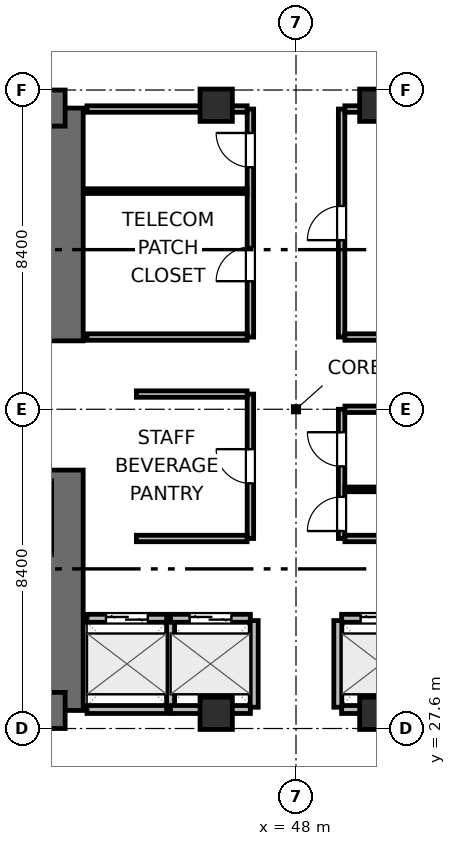
"""IFC4 building model, lengths in metres.
Left out: names, types, materials, properties, quantities, classifications, styles, units other than length and angle.
Written with IfcOpenShell. Run it as: python <this file> out.ifc"""

import sys

from ifc_helpers import new_model, si_unit, direction, frame, frame_2d, origin, origin_2d, place, context, subcontext, project, spatial, rectangle, extrude, element, fill, save


model = new_model("IFC4")
c1 = context("Model", 3, precision=1e-05, world=origin(), true_north=direction((0.0, 1.0)))
c2 = subcontext(c1, "Body", "Model", "MODEL_VIEW")
j1 = project(units=[si_unit("LENGTHUNIT", "METRE"), si_unit("PLANEANGLEUNIT", "RADIAN")], contexts=[c1])
p1 = place(None, origin())
s1 = spatial("IfcSite", under=j1, at=p1, CompositionType="ELEMENT")
p2 = place(p1, origin())
s2 = spatial("IfcBuilding", under=s1, at=p2, CompositionType="ELEMENT")
p3 = place(p2, frame((0.0, 0.0, 21.6)))
s3 = spatial("IfcBuildingStorey", under=s2, at=p3, CompositionType="ELEMENT", Elevation=21.6)
p4 = place(p3, frame((41.925, 28.075, 0.0), z_axis=(0.0, 0.0, 1.0), x_axis=(0.0, 1.0, 0.0)))
e1 = element("IfcWall", 1, at=p4, inside=s3, PredefinedType="SHEAR", context=c2, shape_type="SweptSolid", body=[
    extrude(rectangle(XDim=6.325, YDim=0.95, at=frame_2d((3.163, 0.0))), origin(), (0.0, 0.0, 1.0), 3.9),
])
p5 = place(p3, frame((41.925, 37.8, 0.0), z_axis=(0.0, 0.0, 1.0), x_axis=(0.0, 1.0, 0.0)))
e2 = element("IfcWall", 2, at=p5, inside=s3, PredefinedType="SHEAR", context=c2, shape_type="SweptSolid", body=[
    extrude(rectangle(XDim=6.125, YDim=0.95, at=frame_2d((3.062, 0.0))), origin(), (0.0, 0.0, 1.0), 3.9),
])
p6 = place(p3, frame((32.875, 28.075, 0.0), z_axis=(0.0, 0.0, 1.0), x_axis=(1.0, 0.0, 0.0)))
e3 = element("IfcWall", 3, at=p6, inside=s3, PredefinedType="SHEAR", context=c2, shape_type="SweptSolid", body=[
    extrude(rectangle(XDim=9.05, YDim=0.95, at=frame_2d((4.525, 0.0))), origin(), (0.0, 0.0, 1.0), 3.9),
])
p7 = place(p6, frame((4.975, 0.0, 0.0)))
e4 = element("IfcOpeningElement", 4, at=p7, cuts=e3, PredefinedType="OPENING", context=c2, shape_type="SweptSolid", body=[
    extrude(rectangle(XDim=1.05, YDim=2.04, at=frame_2d((0.525, 1.02))), frame((0.0, 0.485, 0.0), z_axis=(0.0, -1.0, 0.0), x_axis=(1.0, 0.0, 0.0)), (0.0, 0.0, 1.0), 0.97),
])
p8 = place(p3, frame((32.875, 43.925, 0.0), z_axis=(0.0, 0.0, 1.0), x_axis=(1.0, 0.0, 0.0)))
e5 = element("IfcWall", 5, at=p8, inside=s3, PredefinedType="SHEAR", context=c2, shape_type="SweptSolid", body=[
    extrude(rectangle(XDim=9.05, YDim=0.95, at=frame_2d((4.525, 0.0))), origin(), (0.0, 0.0, 1.0), 3.9),
])
p9 = place(p8, frame((0.975, 0.0, 0.0)))
e6 = element("IfcOpeningElement", 6, at=p9, cuts=e5, PredefinedType="OPENING", context=c2, shape_type="SweptSolid", body=[
    extrude(rectangle(XDim=0.95, YDim=2.04, at=frame_2d((0.475, 1.02))), frame((0.0, 0.485, 0.0), z_axis=(0.0, -1.0, 0.0), x_axis=(1.0, 0.0, 0.0)), (0.0, 0.0, 1.0), 0.97),
])
p10 = place(p8, frame((4.225, 0.0, 0.0)))
e7 = element("IfcOpeningElement", 7, at=p10, cuts=e5, PredefinedType="OPENING", context=c2, shape_type="SweptSolid", body=[
    extrude(rectangle(XDim=0.9, YDim=2.02, at=frame_2d((0.45, 1.01))), frame((0.0, 0.485, 0.0), z_axis=(0.0, -1.0, 0.0), x_axis=(1.0, 0.0, 0.0)), (0.0, 0.0, 1.0), 0.97),
])
p11 = place(p8, frame((7.125, 0.0, 0.0)))
e8 = element("IfcOpeningElement", 8, at=p11, cuts=e5, PredefinedType="OPENING", context=c2, shape_type="SweptSolid", body=[
    extrude(rectangle(XDim=0.9, YDim=2.02, at=frame_2d((0.45, 1.01))), frame((0.0, 0.485, 0.0), z_axis=(0.0, -1.0, 0.0), x_axis=(1.0, 0.0, 0.0)), (0.0, 0.0, 1.0), 0.97),
])
for number, where, z_axis, x_axis in (
    (9, (45.9, 28.0, 0.0), (0.0, 0.0, 1.0), (1.0, 0.0, 0.0)),
    (10, (50.1, 28.0, 0.0), (0.0, 0.0, 1.0), (1.0, 0.0, 0.0)),
    (11, (45.9, 44.0, 0.0), (0.0, 0.0, 1.0), (1.0, 0.0, 0.0)),
    (12, (50.1, 44.0, 0.0), (0.0, 0.0, 1.0), (1.0, 0.0, 0.0)),
):
    element("IfcColumn", number, at=place(p3, frame(where, z_axis=z_axis, x_axis=x_axis)), inside=s3, PredefinedType="COLUMN", context=c2, shape_type="SweptSolid", body=[
        extrude(rectangle(XDim=0.85, YDim=0.85, at=origin_2d()), origin(), (0.0, 0.0, 1.0), 3.9),
    ])
p12 = place(p3, frame((42.5, 30.5, 0.0), z_axis=(0.0, 0.0, 1.0), x_axis=(1.0, 0.0, 0.0)))
e13 = element("IfcWall", 13, at=p12, inside=s3, PredefinedType="PARTITIONING", context=c2, shape_type="SweptSolid", body=[
    extrude(rectangle(XDim=2.1, YDim=0.21, at=frame_2d((1.05, 0.0))), origin(), (0.0, 0.0, 1.0), 3.64),
])
p13 = place(p12, frame((0.5, 0.0, 0.0)))
e14 = element("IfcOpeningElement", 14, at=p13, cuts=e13, PredefinedType="OPENING", context=c2, shape_type="SweptSolid", body=[
    extrude(rectangle(XDim=1.1, YDim=2.04, at=frame_2d((0.55, 1.02))), frame((0.0, 0.115, 0.0), z_axis=(0.0, -1.0, 0.0), x_axis=(1.0, 0.0, 0.0)), (0.0, 0.0, 1.0), 0.23),
])
p14 = place(p3, frame((42.5, 28.1, 0.0), z_axis=(0.0, 0.0, 1.0), x_axis=(1.0, 0.0, 0.0)))
e15 = element("IfcWall", 15, at=p14, inside=s3, PredefinedType="PARTITIONING", context=c2, shape_type="SweptSolid", body=[
    extrude(rectangle(XDim=2.1, YDim=0.21, at=frame_2d((1.05, 0.0))), origin(), (0.0, 0.0, 1.0), 2.525),
])
p15 = place(p3, frame((44.7, 28.16, 0.0), z_axis=(0.0, 0.0, 1.0), x_axis=(0.0, 1.0, 0.0)))
e16 = element("IfcWall", 16, at=p15, inside=s3, PredefinedType="PARTITIONING", context=c2, shape_type="SweptSolid", body=[
    extrude(rectangle(XDim=2.28, YDim=0.21, at=frame_2d((1.14, 0.0))), origin(), (0.0, 0.0, 1.0), 3.64),
])
p16 = place(p3, frame((44.7, 30.5, 0.0), z_axis=(0.0, 0.0, 1.0), x_axis=(1.0, 0.0, 0.0)))
e17 = element("IfcWall", 17, at=p16, inside=s3, PredefinedType="PARTITIONING", context=c2, shape_type="SweptSolid", body=[
    extrude(rectangle(XDim=2.1, YDim=0.21, at=frame_2d((1.05, 0.0))), origin(), (0.0, 0.0, 1.0), 3.64),
])
p17 = place(p16, frame((0.5, 0.0, 0.0)))
e18 = element("IfcOpeningElement", 18, at=p17, cuts=e17, PredefinedType="OPENING", context=c2, shape_type="SweptSolid", body=[
    extrude(rectangle(XDim=1.1, YDim=2.04, at=frame_2d((0.55, 1.02))), frame((0.0, 0.115, 0.0), z_axis=(0.0, -1.0, 0.0), x_axis=(1.0, 0.0, 0.0)), (0.0, 0.0, 1.0), 0.23),
])
p18 = place(p3, frame((44.7, 28.1, 0.0), z_axis=(0.0, 0.0, 1.0), x_axis=(1.0, 0.0, 0.0)))
e19 = element("IfcWall", 19, at=p18, inside=s3, PredefinedType="PARTITIONING", context=c2, shape_type="SweptSolid", body=[
    extrude(rectangle(XDim=2.1, YDim=0.21, at=frame_2d((1.05, 0.0))), origin(), (0.0, 0.0, 1.0), 2.525),
])
p19 = place(p3, frame((46.9, 28.16, 0.0), z_axis=(0.0, 0.0, 1.0), x_axis=(0.0, 1.0, 0.0)))
e20 = element("IfcWall", 20, at=p19, inside=s3, PredefinedType="PARTITIONING", context=c2, shape_type="SweptSolid", body=[
    extrude(rectangle(XDim=2.28, YDim=0.21, at=frame_2d((1.14, 0.0))), origin(), (0.0, 0.0, 1.0), 3.64),
])
p20 = place(p3, frame((49.2, 30.5, 0.0), z_axis=(0.0, 0.0, 1.0), x_axis=(1.0, 0.0, 0.0)))
e21 = element("IfcWall", 21, at=p20, inside=s3, PredefinedType="PARTITIONING", context=c2, shape_type="SweptSolid", body=[
    extrude(rectangle(XDim=2.1, YDim=0.21, at=frame_2d((1.05, 0.0))), origin(), (0.0, 0.0, 1.0), 3.64),
])
p21 = place(p20, frame((0.5, 0.0, 0.0)))
e22 = element("IfcOpeningElement", 22, at=p21, cuts=e21, PredefinedType="OPENING", context=c2, shape_type="SweptSolid", body=[
    extrude(rectangle(XDim=1.1, YDim=2.04, at=frame_2d((0.55, 1.02))), frame((0.0, 0.115, 0.0), z_axis=(0.0, -1.0, 0.0), x_axis=(1.0, 0.0, 0.0)), (0.0, 0.0, 1.0), 0.23),
])
p22 = place(p3, frame((49.2, 28.1, 0.0), z_axis=(0.0, 0.0, 1.0), x_axis=(1.0, 0.0, 0.0)))
e23 = element("IfcWall", 23, at=p22, inside=s3, PredefinedType="PARTITIONING", context=c2, shape_type="SweptSolid", body=[
    extrude(rectangle(XDim=2.1, YDim=0.21, at=frame_2d((1.05, 0.0))), origin(), (0.0, 0.0, 1.0), 2.525),
])
p23 = place(p3, frame((49.1, 28.16, 0.0), z_axis=(0.0, 0.0, 1.0), x_axis=(0.0, 1.0, 0.0)))
e24 = element("IfcWall", 24, at=p23, inside=s3, PredefinedType="PARTITIONING", context=c2, shape_type="SweptSolid", body=[
    extrude(rectangle(XDim=2.28, YDim=0.21, at=frame_2d((1.14, 0.0))), origin(), (0.0, 0.0, 1.0), 3.64),
])
p24 = place(p3, frame((46.8, 32.6, 0.0), z_axis=(0.0, 0.0, 1.0), x_axis=(0.0, 1.0, 0.0)))
e25 = element("IfcWall", 25, at=p24, inside=s3, PredefinedType="PARTITIONING", context=c2, shape_type="SweptSolid", body=[
    extrude(rectangle(XDim=3.8, YDim=0.17, at=frame_2d((1.9, 0.0))), origin(), (0.0, 0.0, 1.0), 3.64),
])
p25 = place(p24, frame((1.45, 0.0, 0.0)))
e26 = element("IfcOpeningElement", 26, at=p25, cuts=e25, PredefinedType="OPENING", context=c2, shape_type="SweptSolid", body=[
    extrude(rectangle(XDim=0.9, YDim=2.02, at=frame_2d((0.45, 1.01))), frame((0.0, 0.095, 0.0), z_axis=(0.0, -1.0, 0.0), x_axis=(1.0, 0.0, 0.0)), (0.0, 0.0, 1.0), 0.19),
])
for number, where, z_axis, x_axis in (
    (27, (43.8, 32.6, 0.0), (0.0, 0.0, 1.0), (1.0, 0.0, 0.0)),
    (28, (43.8, 36.4, 0.0), (0.0, 0.0, 1.0), (1.0, 0.0, 0.0)),
):
    element("IfcWall", number, at=place(p3, frame(where, z_axis=z_axis, x_axis=x_axis)), inside=s3, PredefinedType="PARTITIONING", context=c2, shape_type="SweptSolid", body=[
        extrude(rectangle(XDim=2.913, YDim=0.17, at=frame_2d((1.457, 0.0))), origin(), (0.0, 0.0, 1.0), 3.64),
    ])
p26 = place(p3, frame((49.2, 32.6, 0.0), z_axis=(0.0, 0.0, 1.0), x_axis=(0.0, 1.0, 0.0)))
e29 = element("IfcWall", 29, at=p26, inside=s3, PredefinedType="PARTITIONING", context=c2, shape_type="SweptSolid", body=[
    extrude(rectangle(XDim=3.4, YDim=0.17, at=frame_2d((1.7, 0.0))), origin(), (0.0, 0.0, 1.0), 3.64),
])
p27 = place(p26, frame((0.196, 0.0, 0.0)))
e30 = element("IfcOpeningElement", 30, at=p27, cuts=e29, PredefinedType="OPENING", context=c2, shape_type="SweptSolid", body=[
    extrude(rectangle(XDim=0.9, YDim=2.02, at=frame_2d((0.45, 1.01))), frame((0.0, 0.095, 0.0), z_axis=(0.0, -1.0, 0.0), x_axis=(1.0, 0.0, 0.0)), (0.0, 0.0, 1.0), 0.19),
])
p28 = place(p26, frame((1.896, 0.0, 0.0)))
e31 = element("IfcOpeningElement", 31, at=p28, cuts=e29, PredefinedType="OPENING", context=c2, shape_type="SweptSolid", body=[
    extrude(rectangle(XDim=0.9, YDim=2.02, at=frame_2d((0.45, 1.01))), frame((0.0, 0.095, 0.0), z_axis=(0.0, -1.0, 0.0), x_axis=(1.0, 0.0, 0.0)), (0.0, 0.0, 1.0), 0.19),
])
for number, where, z_axis, x_axis in (
    (32, (49.287, 32.6, 0.0), (0.0, 0.0, 1.0), (1.0, 0.0, 0.0)),
    (33, (49.287, 36.0, 0.0), (0.0, 0.0, 1.0), (1.0, 0.0, 0.0)),
):
    element("IfcWall", number, at=place(p3, frame(where, z_axis=z_axis, x_axis=x_axis)), inside=s3, PredefinedType="PARTITIONING", context=c2, shape_type="SweptSolid", body=[
        extrude(rectangle(XDim=2.913, YDim=0.17, at=frame_2d((1.457, 0.0))), origin(), (0.0, 0.0, 1.0), 3.64),
    ])
p29 = place(p3, frame((49.287, 33.892, 0.0), z_axis=(0.0, 0.0, 1.0), x_axis=(1.0, 0.0, 0.0)))
e34 = element("IfcWall", 34, at=p29, inside=s3, PredefinedType="PARTITIONING", context=c2, shape_type="SweptSolid", body=[
    extrude(rectangle(XDim=2.913, YDim=0.125, at=frame_2d((1.457, 0.0))), origin(), (0.0, 0.0, 1.0), 3.64),
])
p30 = place(p3, frame((46.8, 37.9, 0.0), z_axis=(0.0, 0.0, 1.0), x_axis=(0.0, 1.0, 0.0)))
e35 = element("IfcWall", 35, at=p30, inside=s3, PredefinedType="PARTITIONING", context=c2, shape_type="SweptSolid", body=[
    extrude(rectangle(XDim=6.0, YDim=0.17, at=frame_2d((3.0, 0.0))), origin(), (0.0, 0.0, 1.0), 3.64),
])
p31 = place(p30, frame((1.47, 0.0, 0.0)))
e36 = element("IfcOpeningElement", 36, at=p31, cuts=e35, PredefinedType="OPENING", context=c2, shape_type="SweptSolid", body=[
    extrude(rectangle(XDim=0.9, YDim=2.02, at=frame_2d((0.45, 1.01))), frame((0.0, 0.095, 0.0), z_axis=(0.0, -1.0, 0.0), x_axis=(1.0, 0.0, 0.0)), (0.0, 0.0, 1.0), 0.19),
])
p32 = place(p30, frame((4.47, 0.0, 0.0)))
e37 = element("IfcOpeningElement", 37, at=p32, cuts=e35, PredefinedType="OPENING", context=c2, shape_type="SweptSolid", body=[
    extrude(rectangle(XDim=0.9, YDim=2.02, at=frame_2d((0.45, 1.01))), frame((0.0, 0.095, 0.0), z_axis=(0.0, -1.0, 0.0), x_axis=(1.0, 0.0, 0.0)), (0.0, 0.0, 1.0), 0.19),
])
p33 = place(p3, frame((42.5, 37.9, 0.0), z_axis=(0.0, 0.0, 1.0), x_axis=(1.0, 0.0, 0.0)))
e38 = element("IfcWall", 38, at=p33, inside=s3, PredefinedType="PARTITIONING", context=c2, shape_type="SweptSolid", body=[
    extrude(rectangle(XDim=4.213, YDim=0.17, at=frame_2d((2.106, 0.0))), origin(), (0.0, 0.0, 1.0), 3.64),
])
p34 = place(p3, frame((42.5, 43.9, 0.0), z_axis=(0.0, 0.0, 1.0), x_axis=(1.0, 0.0, 0.0)))
e39 = element("IfcWall", 39, at=p34, inside=s3, PredefinedType="PARTITIONING", context=c2, shape_type="SweptSolid", body=[
    extrude(rectangle(XDim=4.213, YDim=0.17, at=frame_2d((2.106, 0.0))), origin(), (0.0, 0.0, 1.0), 2.525),
])
p35 = place(p3, frame((42.5, 41.74, 0.0), z_axis=(0.0, 0.0, 1.0), x_axis=(1.0, 0.0, 0.0)))
e40 = element("IfcWall", 40, at=p35, inside=s3, PredefinedType="PARTITIONING", context=c2, shape_type="SweptSolid", body=[
    extrude(rectangle(XDim=4.213, YDim=0.125, at=frame_2d((2.106, 0.0))), origin(), (0.0, 0.0, 1.0), 3.64),
])
p36 = place(p3, frame((49.2, 37.9, 0.0), z_axis=(0.0, 0.0, 1.0), x_axis=(0.0, 1.0, 0.0)))
e41 = element("IfcWall", 41, at=p36, inside=s3, PredefinedType="PARTITIONING", context=c2, shape_type="SweptSolid", body=[
    extrude(rectangle(XDim=6.0, YDim=0.17, at=frame_2d((3.0, 0.0))), origin(), (0.0, 0.0, 1.0), 3.64),
])
p37 = place(p36, frame((2.55, 0.0, 0.0)))
e42 = element("IfcOpeningElement", 42, at=p37, cuts=e41, PredefinedType="OPENING", context=c2, shape_type="SweptSolid", body=[
    extrude(rectangle(XDim=0.9, YDim=2.02, at=frame_2d((0.45, 1.01))), frame((0.0, 0.095, 0.0), z_axis=(0.0, -1.0, 0.0), x_axis=(1.0, 0.0, 0.0)), (0.0, 0.0, 1.0), 0.19),
])
p38 = place(p3, frame((49.287, 37.9, 0.0), z_axis=(0.0, 0.0, 1.0), x_axis=(1.0, 0.0, 0.0)))
e43 = element("IfcWall", 43, at=p38, inside=s3, PredefinedType="PARTITIONING", context=c2, shape_type="SweptSolid", body=[
    extrude(rectangle(XDim=4.113, YDim=0.17, at=frame_2d((2.056, 0.0))), origin(), (0.0, 0.0, 1.0), 3.64),
])
p39 = place(p3, frame((49.287, 43.9, 0.0), z_axis=(0.0, 0.0, 1.0), x_axis=(1.0, 0.0, 0.0)))
e44 = element("IfcWall", 44, at=p39, inside=s3, PredefinedType="PARTITIONING", context=c2, shape_type="SweptSolid", body=[
    extrude(rectangle(XDim=4.113, YDim=0.17, at=frame_2d((2.056, 0.0))), origin(), (0.0, 0.0, 1.0), 2.525),
])
p40 = place(p13, origin())
e45 = element("IfcDoor", 45, at=p40, inside=s3, OperationType="DOUBLE_DOOR_SLIDING", PredefinedType="DOOR", context=c2, shape_type="SweptSolid", body=[
    extrude(rectangle(XDim=1.1, YDim=2.04, at=frame_2d((0.55, 1.02))), frame((0.0, 0.025, 0.0), z_axis=(0.0, -1.0, 0.0), x_axis=(1.0, 0.0, 0.0)), (0.0, 0.0, 1.0), 0.05),
])
fill(e14, e45)
p41 = place(p17, origin())
e46 = element("IfcDoor", 46, at=p41, inside=s3, OperationType="DOUBLE_DOOR_SLIDING", PredefinedType="DOOR", context=c2, shape_type="SweptSolid", body=[
    extrude(rectangle(XDim=1.1, YDim=2.04, at=frame_2d((0.55, 1.02))), frame((0.0, 0.025, 0.0), z_axis=(0.0, -1.0, 0.0), x_axis=(1.0, 0.0, 0.0)), (0.0, 0.0, 1.0), 0.05),
])
fill(e18, e46)
p42 = place(p21, origin())
e47 = element("IfcDoor", 47, at=p42, inside=s3, OperationType="DOUBLE_DOOR_SLIDING", PredefinedType="DOOR", context=c2, shape_type="SweptSolid", body=[
    extrude(rectangle(XDim=1.1, YDim=2.04, at=frame_2d((0.55, 1.02))), frame((0.0, 0.025, 0.0), z_axis=(0.0, -1.0, 0.0), x_axis=(1.0, 0.0, 0.0)), (0.0, 0.0, 1.0), 0.05),
])
fill(e22, e47)
p43 = place(p25, origin())
e48 = element("IfcDoor", 48, at=p43, inside=s3, OperationType="SINGLE_SWING_RIGHT", PredefinedType="DOOR", context=c2, shape_type="SweptSolid", body=[
    extrude(rectangle(XDim=0.9, YDim=2.02, at=frame_2d((0.45, 1.01))), frame((0.0, 0.025, 0.0), z_axis=(0.0, -1.0, 0.0), x_axis=(1.0, 0.0, 0.0)), (0.0, 0.0, 1.0), 0.05),
])
fill(e26, e48)
p44 = place(p27, origin())
e49 = element("IfcDoor", 49, at=p44, inside=s3, OperationType="SINGLE_SWING_LEFT", PredefinedType="DOOR", context=c2, shape_type="SweptSolid", body=[
    extrude(rectangle(XDim=0.9, YDim=2.02, at=frame_2d((0.45, 1.01))), frame((0.0, 0.025, 0.0), z_axis=(0.0, -1.0, 0.0), x_axis=(1.0, 0.0, 0.0)), (0.0, 0.0, 1.0), 0.05),
])
fill(e30, e49)
p45 = place(p28, origin())
e50 = element("IfcDoor", 50, at=p45, inside=s3, OperationType="SINGLE_SWING_RIGHT", PredefinedType="DOOR", context=c2, shape_type="SweptSolid", body=[
    extrude(rectangle(XDim=0.9, YDim=2.02, at=frame_2d((0.45, 1.01))), frame((0.0, 0.025, 0.0), z_axis=(0.0, -1.0, 0.0), x_axis=(1.0, 0.0, 0.0)), (0.0, 0.0, 1.0), 0.05),
])
fill(e31, e50)
p46 = place(p31, origin())
e51 = element("IfcDoor", 51, at=p46, inside=s3, OperationType="SINGLE_SWING_LEFT", PredefinedType="DOOR", context=c2, shape_type="SweptSolid", body=[
    extrude(rectangle(XDim=0.9, YDim=2.02, at=frame_2d((0.45, 1.01))), frame((0.0, 0.025, 0.0), z_axis=(0.0, -1.0, 0.0), x_axis=(1.0, 0.0, 0.0)), (0.0, 0.0, 1.0), 0.05),
])
fill(e36, e51)
p47 = place(p32, origin())
e52 = element("IfcDoor", 52, at=p47, inside=s3, OperationType="SINGLE_SWING_RIGHT", PredefinedType="DOOR", context=c2, shape_type="SweptSolid", body=[
    extrude(rectangle(XDim=0.9, YDim=2.02, at=frame_2d((0.45, 1.01))), frame((0.0, 0.025, 0.0), z_axis=(0.0, -1.0, 0.0), x_axis=(1.0, 0.0, 0.0)), (0.0, 0.0, 1.0), 0.05),
])
fill(e37, e52)
p48 = place(p37, origin())
e53 = element("IfcDoor", 53, at=p48, inside=s3, OperationType="SINGLE_SWING_LEFT", PredefinedType="DOOR", context=c2, shape_type="SweptSolid", body=[
    extrude(rectangle(XDim=0.9, YDim=2.02, at=frame_2d((0.45, 1.01))), frame((0.0, 0.025, 0.0), z_axis=(0.0, -1.0, 0.0), x_axis=(1.0, 0.0, 0.0)), (0.0, 0.0, 1.0), 0.05),
])
fill(e42, e53)
save(model, sys.argv[1])
